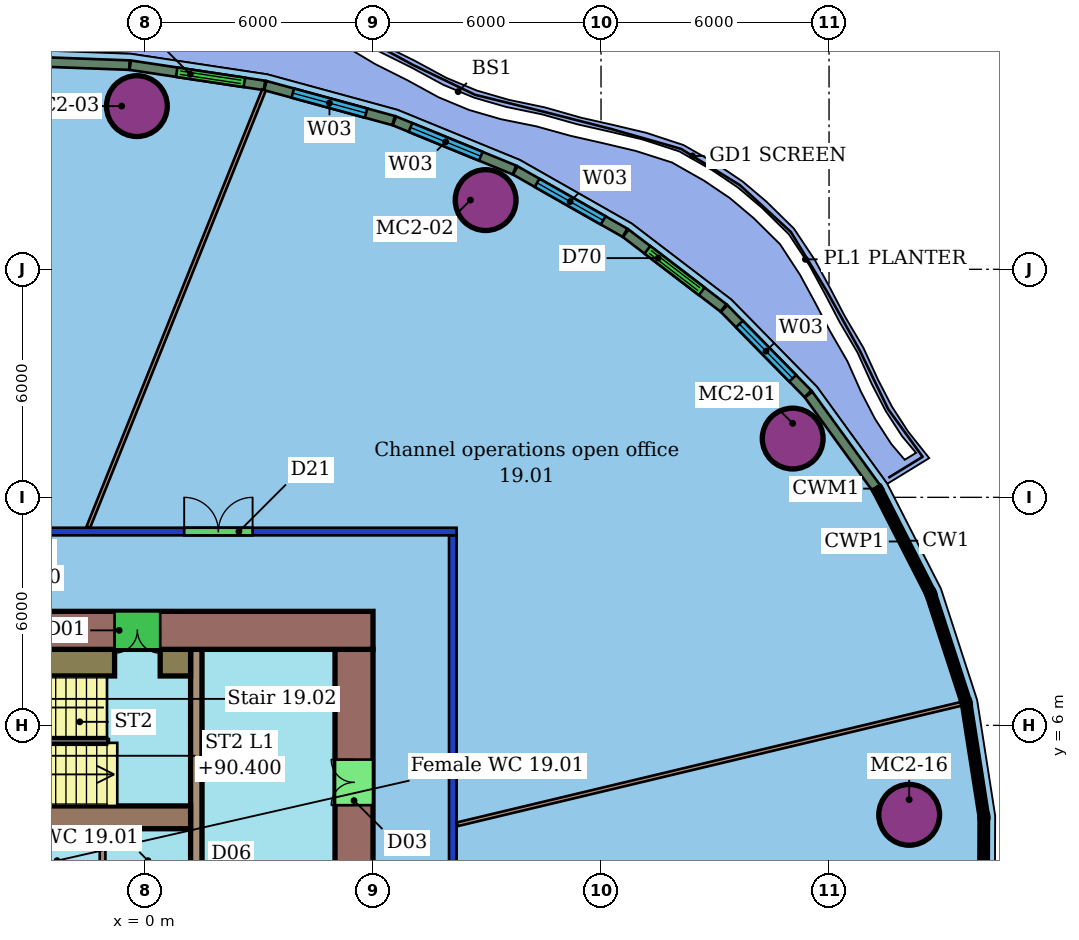
"""IFC4 building model, lengths in metres.
Left out: names, types, materials, properties, quantities, classifications, styles, units other than length and angle.
Written with IfcOpenShell. Run it as: python <this file> out.ifc"""

import sys

from ifc_helpers import new_model, si_unit, direction, frame, frame_2d, origin, origin_2d, place, context, subcontext, project, spatial, rectangle, hollow_circle, extrude, element, fill, save


model = new_model("IFC4")
c1 = context("Model", 3, precision=1e-05, world=origin(), true_north=direction((0.0, 1.0)))
c2 = subcontext(c1, "Body", "Model", "MODEL_VIEW")
j1 = project(units=[si_unit("LENGTHUNIT", "METRE"), si_unit("PLANEANGLEUNIT", "RADIAN")], contexts=[c1])
p1 = place(None, origin())
s1 = spatial("IfcSite", under=j1, at=p1, CompositionType="ELEMENT")
p2 = place(p1, origin())
s2 = spatial("IfcBuilding", under=s1, at=p2, CompositionType="ELEMENT")
p3 = place(p2, frame((0.0, 0.0, 88.6)))
s3 = spatial("IfcBuildingStorey", under=s2, at=p3, CompositionType="ELEMENT", Elevation=88.6)
for number, where, z_axis, x_axis in (
    (1, (17.043, 13.547, 0.0), (0.0, 0.0, 1.0), (1.0, 0.0, 0.0)),
    (2, (8.963, 19.821, 0.0), (0.0, 0.0, 1.0), (1.0, 0.0, 0.0)),
    (3, (-0.213, 22.294, 0.0), (0.0, 0.0, 1.0), (1.0, 0.0, 0.0)),
    (4, (20.109, 3.646, 0.0), (0.0, 0.0, 1.0), (1.0, 0.0, 0.0)),
):
    element("IfcColumn", number, at=place(p3, frame(where, z_axis=z_axis, x_axis=x_axis)), inside=s3, PredefinedType="COLUMN", context=c2, shape_type="SweptSolid", body=[
        extrude(hollow_circle(Radius=0.8, WallThickness=0.055, at=origin_2d()), origin(), (0.0, 0.0, 1.0), 3.45),
    ])
p4 = place(p3, frame((-20.2, 11.1, 0.0), z_axis=(0.0, 0.0, 1.0), x_axis=(1.0, 0.0, 0.0)))
e5 = element("IfcWall", 5, at=p4, inside=s3, PredefinedType="PARTITIONING", context=c2, shape_type="SweptSolid", body=[
    extrude(rectangle(XDim=28.4, YDim=0.2, at=frame_2d((14.2, 0.0))), origin(), (0.0, 0.0, 1.0), 3.0),
])
p5 = place(p4, frame((21.231, 0.0, 0.0)))
e6 = element("IfcOpeningElement", 6, at=p5, cuts=e5, PredefinedType="OPENING", context=c2, shape_type="SweptSolid", body=[
    extrude(rectangle(XDim=1.8, YDim=2.1, at=frame_2d((0.9, 1.05))), frame((0.0, 0.11, 0.0), z_axis=(0.0, -1.0, 0.0), x_axis=(1.0, 0.0, 0.0)), (0.0, 0.0, 1.0), 0.22),
])
p6 = place(p4, frame((13.062, 0.0, 0.0)))
e7 = element("IfcOpeningElement", 7, at=p6, cuts=e5, PredefinedType="OPENING", context=c2, shape_type="SweptSolid", body=[
    extrude(rectangle(XDim=1.8, YDim=2.1, at=frame_2d((0.9, 1.05))), frame((0.0, 0.11, 0.0), z_axis=(0.0, -1.0, 0.0), x_axis=(1.0, 0.0, 0.0)), (0.0, 0.0, 1.0), 0.22),
])
p7 = place(p4, frame((2.468, 0.0, 0.0)))
e8 = element("IfcOpeningElement", 8, at=p7, cuts=e5, PredefinedType="OPENING", context=c2, shape_type="SweptSolid", body=[
    extrude(rectangle(XDim=0.9, YDim=2.1, at=frame_2d((0.45, 1.05))), frame((0.0, 0.11, 0.0), z_axis=(0.0, -1.0, 0.0), x_axis=(1.0, 0.0, 0.0)), (0.0, 0.0, 1.0), 0.22),
])
p8 = place(p3, frame((8.1, 11.0, 0.0), z_axis=(0.0, 0.0, 1.0), x_axis=(0.0, -1.0, 0.0)))
e9 = element("IfcWall", 9, at=p8, inside=s3, PredefinedType="PARTITIONING", context=c2, shape_type="SweptSolid", body=[
    extrude(rectangle(XDim=22.0, YDim=0.2, at=frame_2d((11.0, 0.0))), origin(), (0.0, 0.0, 1.0), 3.0),
])
p9 = place(p8, frame((11.043, 0.0, 0.0)))
e10 = element("IfcOpeningElement", 10, at=p9, cuts=e9, PredefinedType="OPENING", context=c2, shape_type="SweptSolid", body=[
    extrude(rectangle(XDim=1.8, YDim=2.1, at=frame_2d((0.9, 1.05))), frame((0.0, 0.11, 0.0), z_axis=(0.0, -1.0, 0.0), x_axis=(1.0, 0.0, 0.0)), (0.0, 0.0, 1.0), 0.22),
])
p10 = place(p3, frame((21.484, 6.568, 0.0), z_axis=(0.0, 0.0, 1.0), x_axis=(-0.972613719836, -0.232427519856, 0.0)))
e11 = element("IfcWall", 11, at=p10, inside=s3, PredefinedType="PARTITIONING", context=c2, shape_type="SweptSolid", body=[
    extrude(rectangle(XDim=13.646, YDim=0.1, at=frame_2d((6.823, 0.0))), origin(), (0.0, 0.0, 1.0), 3.45),
])
p11 = place(p3, frame((3.13, 22.715, 0.0), z_axis=(0.0, 0.0, 1.0), x_axis=(-0.372949536222, -0.927851627919, 0.0)))
e12 = element("IfcWall", 12, at=p11, inside=s3, PredefinedType="PARTITIONING", context=c2, shape_type="SweptSolid", body=[
    extrude(rectangle(XDim=12.39, YDim=0.1, at=frame_2d((6.195, 0.0))), origin(), (0.0, 0.0, 1.0), 3.45),
])
p12 = place(p3, frame((19.245, 12.244, 0.0), z_axis=(0.0, 0.0, 1.0), x_axis=(-0.586957033691, 0.809618083173, 0.0)))
e13 = element("IfcWall", 13, at=p12, inside=s3, PredefinedType="SOLIDWALL", context=c2, shape_type="SweptSolid", body=[
    extrude(rectangle(XDim=3.037, YDim=0.25, at=frame_2d((1.519, 0.0))), origin(), (0.0, 0.0, 1.0), 3.05),
])
p13 = place(p3, frame((17.445, 14.723, 0.0), z_axis=(0.0, 0.0, 1.0), x_axis=(-0.700641049886, 0.71351392363, 0.0)))
e14 = element("IfcWall", 14, at=p13, inside=s3, PredefinedType="SOLIDWALL", context=c2, shape_type="SweptSolid", body=[
    extrude(rectangle(XDim=3.148, YDim=0.25, at=frame_2d((1.574, 0.0))), origin(), (0.0, 0.0, 1.0), 3.05),
])
p14 = place(p13, frame((0.574, 0.0, 0.9)))
e15 = element("IfcOpeningElement", 15, at=p14, cuts=e14, PredefinedType="OPENING", context=c2, shape_type="SweptSolid", body=[
    extrude(rectangle(XDim=2.0, YDim=2.1, at=frame_2d((1.0, 1.05))), frame((0.0, 0.135, 0.0), z_axis=(0.0, -1.0, 0.0), x_axis=(1.0, 0.0, 0.0)), (0.0, 0.0, 1.0), 0.27),
])
p15 = place(p3, frame((15.219, 16.986, 0.0), z_axis=(0.0, 0.0, 1.0), x_axis=(-0.794820819691, 0.606844184768, 0.0)))
e16 = element("IfcWall", 16, at=p15, inside=s3, PredefinedType="SOLIDWALL", context=c2, shape_type="SweptSolid", body=[
    extrude(rectangle(XDim=3.231, YDim=0.25, at=frame_2d((1.616, 0.0))), origin(), (0.0, 0.0, 1.0), 3.05),
])
p16 = place(p15, frame((0.716, 0.0, 0.0)))
e17 = element("IfcOpeningElement", 17, at=p16, cuts=e16, PredefinedType="OPENING", context=c2, shape_type="SweptSolid", body=[
    extrude(rectangle(XDim=1.8, YDim=2.4, at=frame_2d((0.9, 1.2))), frame((0.0, 0.135, 0.0), z_axis=(0.0, -1.0, 0.0), x_axis=(1.0, 0.0, 0.0)), (0.0, 0.0, 1.0), 0.27),
])
p17 = place(p3, frame((12.63, 18.961, 0.0), z_axis=(0.0, 0.0, 1.0), x_axis=(-0.869344607867, 0.494206386819, 0.0)))
e18 = element("IfcWall", 18, at=p17, inside=s3, PredefinedType="SOLIDWALL", context=c2, shape_type="SweptSolid", body=[
    extrude(rectangle(XDim=3.322, YDim=0.25, at=frame_2d((1.661, 0.0))), origin(), (0.0, 0.0, 1.0), 3.05),
])
p18 = place(p17, frame((0.661, 0.0, 0.9)))
e19 = element("IfcOpeningElement", 19, at=p18, cuts=e18, PredefinedType="OPENING", context=c2, shape_type="SweptSolid", body=[
    extrude(rectangle(XDim=2.0, YDim=2.1, at=frame_2d((1.0, 1.05))), frame((0.0, 0.135, 0.0), z_axis=(0.0, -1.0, 0.0), x_axis=(1.0, 0.0, 0.0)), (0.0, 0.0, 1.0), 0.27),
])
p19 = place(p3, frame((9.721, 20.613, 0.0), z_axis=(0.0, 0.0, 1.0), x_axis=(-0.925471723518, 0.378816695735, 0.0)))
e20 = element("IfcWall", 20, at=p19, inside=s3, PredefinedType="SOLIDWALL", context=c2, shape_type="SweptSolid", body=[
    extrude(rectangle(XDim=3.413, YDim=0.25, at=frame_2d((1.706, 0.0))), origin(), (0.0, 0.0, 1.0), 3.05),
])
p20 = place(p19, frame((0.956, 0.0, 0.9)))
e21 = element("IfcOpeningElement", 21, at=p20, cuts=e20, PredefinedType="OPENING", context=c2, shape_type="SweptSolid", body=[
    extrude(rectangle(XDim=2.0, YDim=2.1, at=frame_2d((1.0, 1.05))), frame((0.0, 0.135, 0.0), z_axis=(0.0, -1.0, 0.0), x_axis=(1.0, 0.0, 0.0)), (0.0, 0.0, 1.0), 0.27),
])
p21 = place(p3, frame((6.541, 21.913, 0.0), z_axis=(0.0, 0.0, 1.0), x_axis=(-0.964717093179, 0.263288682112, 0.0)))
e22 = element("IfcWall", 22, at=p21, inside=s3, PredefinedType="SOLIDWALL", context=c2, shape_type="SweptSolid", body=[
    extrude(rectangle(XDim=3.498, YDim=0.25, at=frame_2d((1.749, 0.0))), origin(), (0.0, 0.0, 1.0), 3.05),
])
p22 = place(p21, frame((0.749, 0.0, 0.9)))
e23 = element("IfcOpeningElement", 23, at=p22, cuts=e22, PredefinedType="OPENING", context=c2, shape_type="SweptSolid", body=[
    extrude(rectangle(XDim=2.0, YDim=2.1, at=frame_2d((1.0, 1.05))), frame((0.0, 0.135, 0.0), z_axis=(0.0, -1.0, 0.0), x_axis=(1.0, 0.0, 0.0)), (0.0, 0.0, 1.0), 0.27),
])
p23 = place(p3, frame((3.145, 22.839, 0.0), z_axis=(0.0, 0.0, 1.0), x_axis=(-0.988850976046, 0.148908519475, 0.0)))
e24 = element("IfcWall", 24, at=p23, inside=s3, PredefinedType="SOLIDWALL", context=c2, shape_type="SweptSolid", body=[
    extrude(rectangle(XDim=3.573, YDim=0.25, at=frame_2d((1.786, 0.0))), origin(), (0.0, 0.0, 1.0), 3.05),
])
p24 = place(p23, frame((0.536, 0.0, 0.0)))
e25 = element("IfcOpeningElement", 25, at=p24, cuts=e24, PredefinedType="OPENING", context=c2, shape_type="SweptSolid", body=[
    extrude(rectangle(XDim=1.8, YDim=2.4, at=frame_2d((0.9, 1.2))), frame((0.0, 0.135, 0.0), z_axis=(0.0, -1.0, 0.0), x_axis=(1.0, 0.0, 0.0)), (0.0, 0.0, 1.0), 0.27),
])
p25 = place(p3, frame((-0.41, 23.373, 0.0), z_axis=(0.0, 0.0, 1.0), x_axis=(-0.999324862533, 0.036739884652, 0.0)))
e26 = element("IfcWall", 26, at=p25, inside=s3, PredefinedType="SOLIDWALL", context=c2, shape_type="SweptSolid", body=[
    extrude(rectangle(XDim=3.588, YDim=0.25, at=frame_2d((1.794, 0.0))), origin(), (0.0, 0.0, 1.0), 3.05),
])
p26 = place(p3, frame((6.0, 8.5, 0.0), z_axis=(0.0, 0.0, 1.0), x_axis=(-1.0, 0.0, 0.0)))
e27 = element("IfcWall", 27, at=p26, inside=s3, PredefinedType="SHEAR", context=c2, shape_type="SweptSolid", body=[
    extrude(rectangle(XDim=12.0, YDim=1.0, at=frame_2d((6.0, 0.0))), origin(), (0.0, 0.0, 1.0), 3.3),
])
p27 = place(p26, frame((5.6, 0.0, 0.0)))
e28 = element("IfcOpeningElement", 28, at=p27, cuts=e27, PredefinedType="OPENING", context=c2, shape_type="SweptSolid", body=[
    extrude(rectangle(XDim=1.2, YDim=2.1, at=frame_2d((0.6, 1.05))), frame((0.0, 0.51, 0.0), z_axis=(0.0, -1.0, 0.0), x_axis=(1.0, 0.0, 0.0)), (0.0, 0.0, 1.0), 1.02),
])
p28 = place(p3, frame((5.5, -8.0, 0.0), z_axis=(0.0, 0.0, 1.0), x_axis=(0.0, 1.0, 0.0)))
e29 = element("IfcWall", 29, at=p28, inside=s3, PredefinedType="SHEAR", context=c2, shape_type="SweptSolid", body=[
    extrude(rectangle(XDim=16.0, YDim=1.0, at=frame_2d((8.0, 0.0))), origin(), (0.0, 0.0, 1.0), 3.3),
])
p29 = place(p28, frame((2.9, 0.0, 0.0)))
e30 = element("IfcOpeningElement", 30, at=p29, cuts=e29, PredefinedType="OPENING", context=c2, shape_type="SweptSolid", body=[
    extrude(rectangle(XDim=1.2, YDim=2.1, at=frame_2d((0.6, 1.05))), frame((0.0, 0.51, 0.0), z_axis=(0.0, -1.0, 0.0), x_axis=(1.0, 0.0, 0.0)), (0.0, 0.0, 1.0), 1.02),
])
p30 = place(p28, frame((11.9, 0.0, 0.0)))
e31 = element("IfcOpeningElement", 31, at=p30, cuts=e29, PredefinedType="OPENING", context=c2, shape_type="SweptSolid", body=[
    extrude(rectangle(XDim=1.2, YDim=2.1, at=frame_2d((0.6, 1.05))), frame((0.0, 0.51, 0.0), z_axis=(0.0, -1.0, 0.0), x_axis=(1.0, 0.0, 0.0)), (0.0, 0.0, 1.0), 1.02),
])
p31 = place(p3, frame((-6.0, 3.58, 0.0), z_axis=(0.0, 0.0, 1.0), x_axis=(1.0, 0.0, 0.0)))
e32 = element("IfcWall", 32, at=p31, inside=s3, PredefinedType="SHEAR", context=c2, shape_type="SweptSolid", body=[
    extrude(rectangle(XDim=7.2, YDim=0.6, at=frame_2d((3.6, 0.0))), origin(), (0.0, 0.0, 1.0), 3.3),
])
p32 = place(p3, frame((1.35, -8.0, 0.0), z_axis=(0.0, 0.0, 1.0), x_axis=(0.0, 1.0, 0.0)))
e33 = element("IfcWall", 33, at=p32, inside=s3, PredefinedType="SHEAR", context=c2, shape_type="SweptSolid", body=[
    extrude(rectangle(XDim=16.0, YDim=0.3, at=frame_2d((8.0, 0.0))), origin(), (0.0, 0.0, 1.0), 3.3),
])
p33 = place(p32, frame((1.91, 0.0, 0.0)))
e34 = element("IfcOpeningElement", 34, at=p33, cuts=e33, PredefinedType="OPENING", context=c2, shape_type="SweptSolid", body=[
    extrude(rectangle(XDim=1.0, YDim=2.1, at=frame_2d((0.5, 1.05))), frame((0.0, 0.16, 0.0), z_axis=(0.0, -1.0, 0.0), x_axis=(1.0, 0.0, 0.0)), (0.0, 0.0, 1.0), 0.32),
])
p34 = place(p32, frame((7.25, 0.0, 0.0)))
e35 = element("IfcOpeningElement", 35, at=p34, cuts=e33, PredefinedType="OPENING", context=c2, shape_type="SweptSolid", body=[
    extrude(rectangle(XDim=1.5, YDim=2.1, at=frame_2d((0.75, 1.05))), frame((0.0, 0.16, 0.0), z_axis=(0.0, -1.0, 0.0), x_axis=(1.0, 0.0, 0.0)), (0.0, 0.0, 1.0), 0.32),
])
p35 = place(p3, frame((-5.85, 7.65, 0.0), z_axis=(0.0, 0.0, 1.0), x_axis=(1.0, 0.0, 0.0)))
e36 = element("IfcWall", 36, at=p35, inside=s3, PredefinedType="SHEAR", context=c2, shape_type="SweptSolid", body=[
    extrude(rectangle(XDim=5.05, YDim=0.7, at=frame_2d((2.525, 0.0))), origin(), (0.0, 0.0, 1.0), 3.3),
])
p36 = place(p3, frame((0.4, 7.65, 0.0), z_axis=(0.0, 0.0, 1.0), x_axis=(1.0, 0.0, 0.0)))
e37 = element("IfcWall", 37, at=p36, inside=s3, PredefinedType="SHEAR", context=c2, shape_type="SweptSolid", body=[
    extrude(rectangle(XDim=0.8, YDim=0.7, at=frame_2d((0.4, 0.0))), origin(), (0.0, 0.0, 1.0), 3.3),
])
p37 = place(p3, frame((-1.117, 1.6, 0.0), z_axis=(0.0, 0.0, 1.0), x_axis=(0.0, 1.0, 0.0)))
e38 = element("IfcWall", 38, at=p37, inside=s3, PredefinedType="PARTITIONING", context=c2, shape_type="SweptSolid", body=[
    extrude(rectangle(XDim=1.68, YDim=0.15, at=frame_2d((0.84, 0.0))), origin(), (0.0, 0.0, 1.0), 3.3),
])
p38 = place(p5, origin())
e39 = element("IfcDoor", 39, at=p38, inside=s3, OperationType="DOUBLE_DOOR_SINGLE_SWING", PredefinedType="DOOR", context=c2, shape_type="SweptSolid", body=[
    extrude(rectangle(XDim=1.8, YDim=2.1, at=frame_2d((0.9, 1.05))), frame((0.0, 0.025, 0.0), z_axis=(0.0, -1.0, 0.0), x_axis=(1.0, 0.0, 0.0)), (0.0, 0.0, 1.0), 0.05),
])
fill(e6, e39)
p39 = place(p14, origin())
e40 = element("IfcWindow", 40, at=p39, inside=s3, PartitioningType="SINGLE_PANEL", PredefinedType="WINDOW", context=c2, shape_type="SweptSolid", body=[
    extrude(rectangle(XDim=2.0, YDim=2.1, at=frame_2d((1.0, 1.05))), frame((0.0, 0.03, 0.0), z_axis=(0.0, -1.0, 0.0), x_axis=(1.0, 0.0, 0.0)), (0.0, 0.0, 1.0), 0.06),
])
fill(e15, e40)
p40 = place(p16, origin())
e41 = element("IfcDoor", 41, at=p40, inside=s3, OperationType="DOUBLE_DOOR_SLIDING", PredefinedType="DOOR", context=c2, shape_type="SweptSolid", body=[
    extrude(rectangle(XDim=1.8, YDim=2.4, at=frame_2d((0.9, 1.2))), frame((0.0, 0.025, 0.0), z_axis=(0.0, -1.0, 0.0), x_axis=(1.0, 0.0, 0.0)), (0.0, 0.0, 1.0), 0.05),
])
fill(e17, e41)
p41 = place(p18, origin())
e42 = element("IfcWindow", 42, at=p41, inside=s3, PartitioningType="SINGLE_PANEL", PredefinedType="WINDOW", context=c2, shape_type="SweptSolid", body=[
    extrude(rectangle(XDim=2.0, YDim=2.1, at=frame_2d((1.0, 1.05))), frame((0.0, 0.03, 0.0), z_axis=(0.0, -1.0, 0.0), x_axis=(1.0, 0.0, 0.0)), (0.0, 0.0, 1.0), 0.06),
])
fill(e19, e42)
p42 = place(p20, origin())
e43 = element("IfcWindow", 43, at=p42, inside=s3, PartitioningType="SINGLE_PANEL", PredefinedType="WINDOW", context=c2, shape_type="SweptSolid", body=[
    extrude(rectangle(XDim=2.0, YDim=2.1, at=frame_2d((1.0, 1.05))), frame((0.0, 0.03, 0.0), z_axis=(0.0, -1.0, 0.0), x_axis=(1.0, 0.0, 0.0)), (0.0, 0.0, 1.0), 0.06),
])
fill(e21, e43)
p43 = place(p22, origin())
e44 = element("IfcWindow", 44, at=p43, inside=s3, PartitioningType="SINGLE_PANEL", PredefinedType="WINDOW", context=c2, shape_type="SweptSolid", body=[
    extrude(rectangle(XDim=2.0, YDim=2.1, at=frame_2d((1.0, 1.05))), frame((0.0, 0.03, 0.0), z_axis=(0.0, -1.0, 0.0), x_axis=(1.0, 0.0, 0.0)), (0.0, 0.0, 1.0), 0.06),
])
fill(e23, e44)
p44 = place(p24, origin())
e45 = element("IfcDoor", 45, at=p44, inside=s3, OperationType="DOUBLE_DOOR_SLIDING", PredefinedType="DOOR", context=c2, shape_type="SweptSolid", body=[
    extrude(rectangle(XDim=1.8, YDim=2.4, at=frame_2d((0.9, 1.2))), frame((0.0, 0.025, 0.0), z_axis=(0.0, -1.0, 0.0), x_axis=(1.0, 0.0, 0.0)), (0.0, 0.0, 1.0), 0.05),
])
fill(e25, e45)
p45 = place(p27, origin())
e46 = element("IfcDoor", 46, at=p45, inside=s3, OperationType="DOUBLE_DOOR_SINGLE_SWING", PredefinedType="NOTDEFINED", context=c2, shape_type="SweptSolid", body=[
    extrude(rectangle(XDim=1.2, YDim=2.1, at=frame_2d((0.6, 1.05))), frame((0.0, 0.025, 0.0), z_axis=(0.0, -1.0, 0.0), x_axis=(1.0, 0.0, 0.0)), (0.0, 0.0, 1.0), 0.05),
])
fill(e28, e46)
p46 = place(p30, origin())
e47 = element("IfcDoor", 47, at=p46, inside=s3, OperationType="DOUBLE_DOOR_SINGLE_SWING", PredefinedType="NOTDEFINED", context=c2, shape_type="SweptSolid", body=[
    extrude(rectangle(XDim=1.2, YDim=2.1, at=frame_2d((0.6, 1.05))), frame((0.0, 0.025, 0.0), z_axis=(0.0, -1.0, 0.0), x_axis=(1.0, 0.0, 0.0)), (0.0, 0.0, 1.0), 0.05),
])
fill(e31, e47)
save(model, sys.argv[1])
